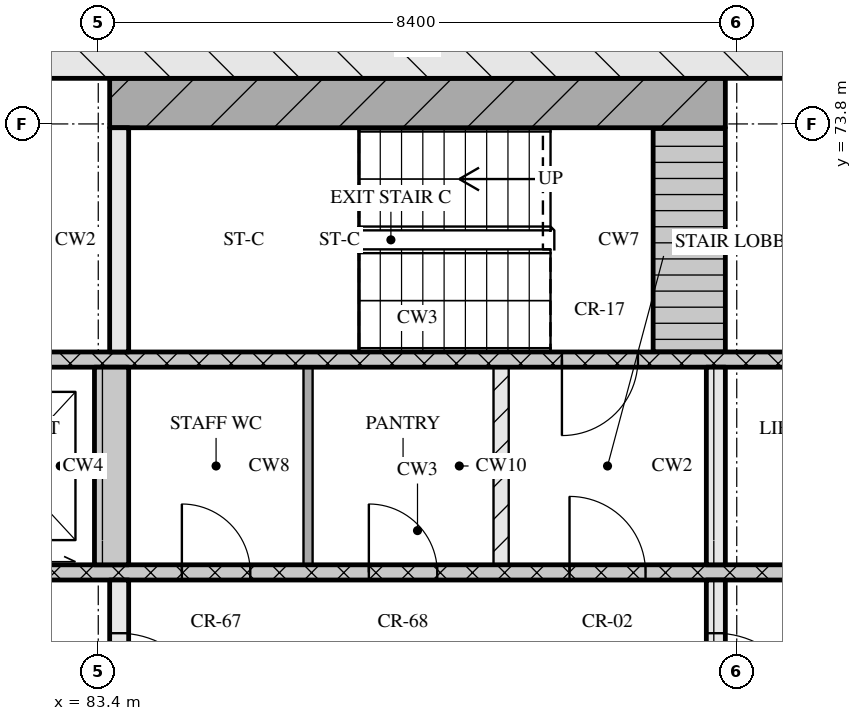
"""IFC4 building model, lengths in metres.
Left out: names, types, materials, properties, quantities, classifications, styles, units other than length and angle.
Written with IfcOpenShell. Run it as: python <this file> out.ifc"""

import sys

from ifc_helpers import new_model, si_unit, direction, frame, frame_2d, origin, place, context, subcontext, project, spatial, rectangle, extrude, element, fill, save


model = new_model("IFC4")
c1 = context("Model", 3, precision=1e-05, world=origin(), true_north=direction((0.0, 1.0)))
c2 = subcontext(c1, "Body", "Model", "MODEL_VIEW")
j1 = project(units=[si_unit("LENGTHUNIT", "METRE"), si_unit("PLANEANGLEUNIT", "RADIAN")], contexts=[c1])
p1 = place(None, origin())
s1 = spatial("IfcSite", under=j1, at=p1, CompositionType="ELEMENT")
p2 = place(p1, origin())
s2 = spatial("IfcBuilding", under=s1, at=p2, CompositionType="ELEMENT")
p3 = place(p2, frame((0.0, 0.0, 127.65)))
s3 = spatial("IfcBuildingStorey", under=s2, at=p3, CompositionType="ELEMENT", Elevation=127.65)
p4 = place(p3, frame((66.8, 74.9, 0.0), z_axis=(0.0, 0.0, 1.0), x_axis=(1.0, 0.0, 0.0)))
e1 = element("IfcWall", 1, at=p4, inside=s3, PredefinedType="SOLIDWALL", context=c2, shape_type="SweptSolid", body=[
    extrude(rectangle(XDim=41.6, YDim=1.0, at=frame_2d((20.8, 0.0))), origin(), (0.0, 0.0, 1.0), 3.32),
])
p5 = place(p3, frame((83.675, 65.2, 0.0), z_axis=(0.0, 0.0, 1.0), x_axis=(0.0, 1.0, 0.0)))
e2 = element("IfcWall", 2, at=p5, inside=s3, PredefinedType="SOLIDWALL", context=c2, shape_type="SweptSolid", body=[
    extrude(rectangle(XDim=2.6, YDim=0.25, at=frame_2d((1.3, 0.0))), origin(), (0.0, 0.0, 1.0), 3.32),
])
p6 = place(p5, frame((0.7, 0.0, 0.0)))
e3 = element("IfcOpeningElement", 3, at=p6, cuts=e2, PredefinedType="OPENING", context=c2, shape_type="SweptSolid", body=[
    extrude(rectangle(XDim=1.2, YDim=2.1, at=frame_2d((0.6, 1.05))), frame((0.0, 0.135, 0.0), z_axis=(0.0, -1.0, 0.0), x_axis=(1.0, 0.0, 0.0)), (0.0, 0.0, 1.0), 0.27),
])
p7 = place(p3, frame((91.525, 65.2, 0.0), z_axis=(0.0, 0.0, 1.0), x_axis=(0.0, 1.0, 0.0)))
e4 = element("IfcWall", 4, at=p7, inside=s3, PredefinedType="SOLIDWALL", context=c2, shape_type="SweptSolid", body=[
    extrude(rectangle(XDim=2.6, YDim=0.25, at=frame_2d((1.3, 0.0))), origin(), (0.0, 0.0, 1.0), 3.32),
])
p8 = place(p7, frame((0.7, 0.0, 0.0)))
e5 = element("IfcOpeningElement", 5, at=p8, cuts=e4, PredefinedType="OPENING", context=c2, shape_type="SweptSolid", body=[
    extrude(rectangle(XDim=1.2, YDim=2.1, at=frame_2d((0.6, 1.05))), frame((0.0, 0.135, 0.0), z_axis=(0.0, -1.0, 0.0), x_axis=(1.0, 0.0, 0.0)), (0.0, 0.0, 1.0), 0.27),
])
p9 = place(p3, frame((76.05, 67.9, 0.0), z_axis=(0.0, 0.0, 1.0), x_axis=(1.0, 0.0, 0.0)))
e6 = element("IfcWall", 6, at=p9, inside=s3, PredefinedType="SOLIDWALL", context=c2, shape_type="SweptSolid", body=[
    extrude(rectangle(XDim=23.1, YDim=0.2, at=frame_2d((11.55, 0.0))), origin(), (0.0, 0.0, 1.0), 3.32),
])
p10 = place(p9, frame((0.6, 0.0, 0.0)))
e7 = element("IfcOpeningElement", 7, at=p10, cuts=e6, PredefinedType="OPENING", context=c2, shape_type="SweptSolid", body=[
    extrude(rectangle(XDim=1.1, YDim=2.1, at=frame_2d((0.55, 1.05))), frame((0.0, 0.11, 0.0), z_axis=(0.0, -1.0, 0.0), x_axis=(1.0, 0.0, 0.0)), (0.0, 0.0, 1.0), 0.22),
])
p11 = place(p9, frame((3.1, 0.0, 0.0)))
e8 = element("IfcOpeningElement", 8, at=p11, cuts=e6, PredefinedType="OPENING", context=c2, shape_type="SweptSolid", body=[
    extrude(rectangle(XDim=1.1, YDim=2.1, at=frame_2d((0.55, 1.05))), frame((0.0, 0.11, 0.0), z_axis=(0.0, -1.0, 0.0), x_axis=(1.0, 0.0, 0.0)), (0.0, 0.0, 1.0), 0.22),
])
p12 = place(p9, frame((5.6, 0.0, 0.0)))
e9 = element("IfcOpeningElement", 9, at=p12, cuts=e6, PredefinedType="OPENING", context=c2, shape_type="SweptSolid", body=[
    extrude(rectangle(XDim=1.1, YDim=2.1, at=frame_2d((0.55, 1.05))), frame((0.0, 0.11, 0.0), z_axis=(0.0, -1.0, 0.0), x_axis=(1.0, 0.0, 0.0)), (0.0, 0.0, 1.0), 0.22),
])
p13 = place(p9, frame((8.45, 0.0, 0.0)))
e10 = element("IfcOpeningElement", 10, at=p13, cuts=e6, PredefinedType="OPENING", context=c2, shape_type="SweptSolid", body=[
    extrude(rectangle(XDim=0.9, YDim=2.1, at=frame_2d((0.45, 1.05))), frame((0.0, 0.11, 0.0), z_axis=(0.0, -1.0, 0.0), x_axis=(1.0, 0.0, 0.0)), (0.0, 0.0, 1.0), 0.22),
])
p14 = place(p9, frame((10.91, 0.0, 0.0)))
e11 = element("IfcOpeningElement", 11, at=p14, cuts=e6, PredefinedType="OPENING", context=c2, shape_type="SweptSolid", body=[
    extrude(rectangle(XDim=0.9, YDim=2.1, at=frame_2d((0.45, 1.05))), frame((0.0, 0.11, 0.0), z_axis=(0.0, -1.0, 0.0), x_axis=(1.0, 0.0, 0.0)), (0.0, 0.0, 1.0), 0.22),
])
p15 = place(p9, frame((13.55, 0.0, 0.0)))
e12 = element("IfcOpeningElement", 12, at=p15, cuts=e6, PredefinedType="OPENING", context=c2, shape_type="SweptSolid", body=[
    extrude(rectangle(XDim=1.0, YDim=2.1, at=frame_2d((0.5, 1.05))), frame((0.0, 0.11, 0.0), z_axis=(0.0, -1.0, 0.0), x_axis=(1.0, 0.0, 0.0)), (0.0, 0.0, 1.0), 0.22),
])
p16 = place(p3, frame((83.575, 68.0, 0.0), z_axis=(0.0, 0.0, 1.0), x_axis=(0.0, 1.0, 0.0)))
e13 = element("IfcWall", 13, at=p16, inside=s3, PredefinedType="SOLIDWALL", context=c2, shape_type="SweptSolid", body=[
    extrude(rectangle(XDim=2.6, YDim=0.45, at=frame_2d((1.3, 0.0))), origin(), (0.0, 0.0, 1.0), 3.32),
])
p17 = place(p3, frame((86.16, 68.0, 0.0), z_axis=(0.0, 0.0, 1.0), x_axis=(0.0, 1.0, 0.0)))
e14 = element("IfcWall", 14, at=p17, inside=s3, PredefinedType="PARTITIONING", context=c2, shape_type="SweptSolid", body=[
    extrude(rectangle(XDim=2.6, YDim=0.12, at=frame_2d((1.3, 0.0))), origin(), (0.0, 0.0, 1.0), 3.32),
])
p18 = place(p3, frame((88.7, 68.0, 0.0), z_axis=(0.0, 0.0, 1.0), x_axis=(0.0, 1.0, 0.0)))
e15 = element("IfcWall", 15, at=p18, inside=s3, PredefinedType="PARTITIONING", context=c2, shape_type="SweptSolid", body=[
    extrude(rectangle(XDim=2.6, YDim=0.2, at=frame_2d((1.3, 0.0))), origin(), (0.0, 0.0, 1.0), 3.32),
])
p19 = place(p3, frame((91.525, 68.0, 0.0), z_axis=(0.0, 0.0, 1.0), x_axis=(0.0, 1.0, 0.0)))
e16 = element("IfcWall", 16, at=p19, inside=s3, PredefinedType="SOLIDWALL", context=c2, shape_type="SweptSolid", body=[
    extrude(rectangle(XDim=2.6, YDim=0.25, at=frame_2d((1.3, 0.0))), origin(), (0.0, 0.0, 1.0), 3.32),
])
p20 = place(p3, frame((67.8, 70.7, 0.0), z_axis=(0.0, 0.0, 1.0), x_axis=(1.0, 0.0, 0.0)))
e17 = element("IfcWall", 17, at=p20, inside=s3, PredefinedType="SOLIDWALL", context=c2, shape_type="SweptSolid", body=[
    extrude(rectangle(XDim=39.6, YDim=0.2, at=frame_2d((19.8, 0.0))), origin(), (0.0, 0.0, 1.0), 3.32),
])
p21 = place(p20, frame((0.65, 0.0, 0.0)))
e18 = element("IfcOpeningElement", 18, at=p21, cuts=e17, PredefinedType="OPENING", context=c2, shape_type="SweptSolid", body=[
    extrude(rectangle(XDim=1.1, YDim=2.1, at=frame_2d((0.55, 1.05))), frame((0.0, 0.11, 0.0), z_axis=(0.0, -1.0, 0.0), x_axis=(1.0, 0.0, 0.0)), (0.0, 0.0, 1.0), 0.22),
])
p22 = place(p20, frame((3.25, 0.0, 0.0)))
e19 = element("IfcOpeningElement", 19, at=p22, cuts=e17, PredefinedType="OPENING", context=c2, shape_type="SweptSolid", body=[
    extrude(rectangle(XDim=1.1, YDim=2.1, at=frame_2d((0.55, 1.05))), frame((0.0, 0.11, 0.0), z_axis=(0.0, -1.0, 0.0), x_axis=(1.0, 0.0, 0.0)), (0.0, 0.0, 1.0), 0.22),
])
p23 = place(p20, frame((5.9, 0.0, 0.0)))
e20 = element("IfcOpeningElement", 20, at=p23, cuts=e17, PredefinedType="OPENING", context=c2, shape_type="SweptSolid", body=[
    extrude(rectangle(XDim=1.0, YDim=2.1, at=frame_2d((0.5, 1.05))), frame((0.0, 0.11, 0.0), z_axis=(0.0, -1.0, 0.0), x_axis=(1.0, 0.0, 0.0)), (0.0, 0.0, 1.0), 0.22),
])
p24 = place(p20, frame((21.7, 0.0, 0.0)))
e21 = element("IfcOpeningElement", 21, at=p24, cuts=e17, PredefinedType="OPENING", context=c2, shape_type="SweptSolid", body=[
    extrude(rectangle(XDim=1.0, YDim=2.1, at=frame_2d((0.5, 1.05))), frame((0.0, 0.11, 0.0), z_axis=(0.0, -1.0, 0.0), x_axis=(1.0, 0.0, 0.0)), (0.0, 0.0, 1.0), 0.22),
])
p25 = place(p20, frame((32.7, 0.0, 0.0)))
e22 = element("IfcOpeningElement", 22, at=p25, cuts=e17, PredefinedType="OPENING", context=c2, shape_type="SweptSolid", body=[
    extrude(rectangle(XDim=1.0, YDim=2.1, at=frame_2d((0.5, 1.05))), frame((0.0, 0.11, 0.0), z_axis=(0.0, -1.0, 0.0), x_axis=(1.0, 0.0, 0.0)), (0.0, 0.0, 1.0), 0.22),
])
p26 = place(p20, frame((35.25, 0.0, 0.0)))
e23 = element("IfcOpeningElement", 23, at=p26, cuts=e17, PredefinedType="OPENING", context=c2, shape_type="SweptSolid", body=[
    extrude(rectangle(XDim=1.1, YDim=2.1, at=frame_2d((0.55, 1.05))), frame((0.0, 0.11, 0.0), z_axis=(0.0, -1.0, 0.0), x_axis=(1.0, 0.0, 0.0)), (0.0, 0.0, 1.0), 0.22),
])
p27 = place(p20, frame((37.85, 0.0, 0.0)))
e24 = element("IfcOpeningElement", 24, at=p27, cuts=e17, PredefinedType="OPENING", context=c2, shape_type="SweptSolid", body=[
    extrude(rectangle(XDim=1.1, YDim=2.1, at=frame_2d((0.55, 1.05))), frame((0.0, 0.11, 0.0), z_axis=(0.0, -1.0, 0.0), x_axis=(1.0, 0.0, 0.0)), (0.0, 0.0, 1.0), 0.22),
])
p28 = place(p3, frame((83.675, 70.8, 0.0), z_axis=(0.0, 0.0, 1.0), x_axis=(0.0, 1.0, 0.0)))
e25 = element("IfcWall", 25, at=p28, inside=s3, PredefinedType="SOLIDWALL", context=c2, shape_type="SweptSolid", body=[
    extrude(rectangle(XDim=2.95, YDim=0.25, at=frame_2d((1.475, 0.0))), origin(), (0.0, 0.0, 1.0), 3.32),
])
p29 = place(p3, frame((91.175, 70.8, 0.0), z_axis=(0.0, 0.0, 1.0), x_axis=(0.0, 1.0, 0.0)))
e26 = element("IfcWall", 26, at=p29, inside=s3, PredefinedType="SOLIDWALL", context=c2, shape_type="SweptSolid", body=[
    extrude(rectangle(XDim=2.95, YDim=0.95, at=frame_2d((1.475, 0.0))), origin(), (0.0, 0.0, 1.0), 3.32),
])
p30 = place(p3, frame((83.55, 74.075, 0.0), z_axis=(0.0, 0.0, 1.0), x_axis=(1.0, 0.0, 0.0)))
e27 = element("IfcWall", 27, at=p30, inside=s3, PredefinedType="SOLIDWALL", context=c2, shape_type="SweptSolid", body=[
    extrude(rectangle(XDim=8.1, YDim=0.65, at=frame_2d((4.05, 0.0))), origin(), (0.0, 0.0, 1.0), 3.32),
])
p31 = place(p6, origin())
e28 = element("IfcDoor", 28, at=p31, inside=s3, OperationType="SINGLE_SWING_RIGHT", PredefinedType="DOOR", context=c2, shape_type="SweptSolid", body=[
    extrude(rectangle(XDim=1.2, YDim=2.1, at=frame_2d((0.6, 1.05))), frame((0.0, 0.025, 0.0), z_axis=(0.0, -1.0, 0.0), x_axis=(1.0, 0.0, 0.0)), (0.0, 0.0, 1.0), 0.05),
])
fill(e3, e28)
p32 = place(p8, origin())
e29 = element("IfcDoor", 29, at=p32, inside=s3, OperationType="SINGLE_SWING_RIGHT", PredefinedType="DOOR", context=c2, shape_type="SweptSolid", body=[
    extrude(rectangle(XDim=1.2, YDim=2.1, at=frame_2d((0.6, 1.05))), frame((0.0, 0.025, 0.0), z_axis=(0.0, -1.0, 0.0), x_axis=(1.0, 0.0, 0.0)), (0.0, 0.0, 1.0), 0.05),
])
fill(e5, e29)
p33 = place(p13, origin())
e30 = element("IfcDoor", 30, at=p33, inside=s3, OperationType="SINGLE_SWING_LEFT", PredefinedType="DOOR", context=c2, shape_type="SweptSolid", body=[
    extrude(rectangle(XDim=0.9, YDim=2.1, at=frame_2d((0.45, 1.05))), frame((0.0, 0.025, 0.0), z_axis=(0.0, -1.0, 0.0), x_axis=(1.0, 0.0, 0.0)), (0.0, 0.0, 1.0), 0.05),
])
fill(e10, e30)
p34 = place(p14, origin())
e31 = element("IfcDoor", 31, at=p34, inside=s3, OperationType="SINGLE_SWING_LEFT", PredefinedType="DOOR", context=c2, shape_type="SweptSolid", body=[
    extrude(rectangle(XDim=0.9, YDim=2.1, at=frame_2d((0.45, 1.05))), frame((0.0, 0.025, 0.0), z_axis=(0.0, -1.0, 0.0), x_axis=(1.0, 0.0, 0.0)), (0.0, 0.0, 1.0), 0.05),
])
fill(e11, e31)
p35 = place(p15, origin())
e32 = element("IfcDoor", 32, at=p35, inside=s3, OperationType="SINGLE_SWING_LEFT", PredefinedType="DOOR", context=c2, shape_type="SweptSolid", body=[
    extrude(rectangle(XDim=1.0, YDim=2.1, at=frame_2d((0.5, 1.05))), frame((0.0, 0.025, 0.0), z_axis=(0.0, -1.0, 0.0), x_axis=(1.0, 0.0, 0.0)), (0.0, 0.0, 1.0), 0.05),
])
fill(e12, e32)
p36 = place(p24, origin())
e33 = element("IfcDoor", 33, at=p36, inside=s3, OperationType="SINGLE_SWING_RIGHT", PredefinedType="DOOR", context=c2, shape_type="SweptSolid", body=[
    extrude(rectangle(XDim=1.0, YDim=2.1, at=frame_2d((0.5, 1.05))), frame((0.0, 0.025, 0.0), z_axis=(0.0, -1.0, 0.0), x_axis=(1.0, 0.0, 0.0)), (0.0, 0.0, 1.0), 0.05),
])
fill(e21, e33)
save(model, sys.argv[1])
